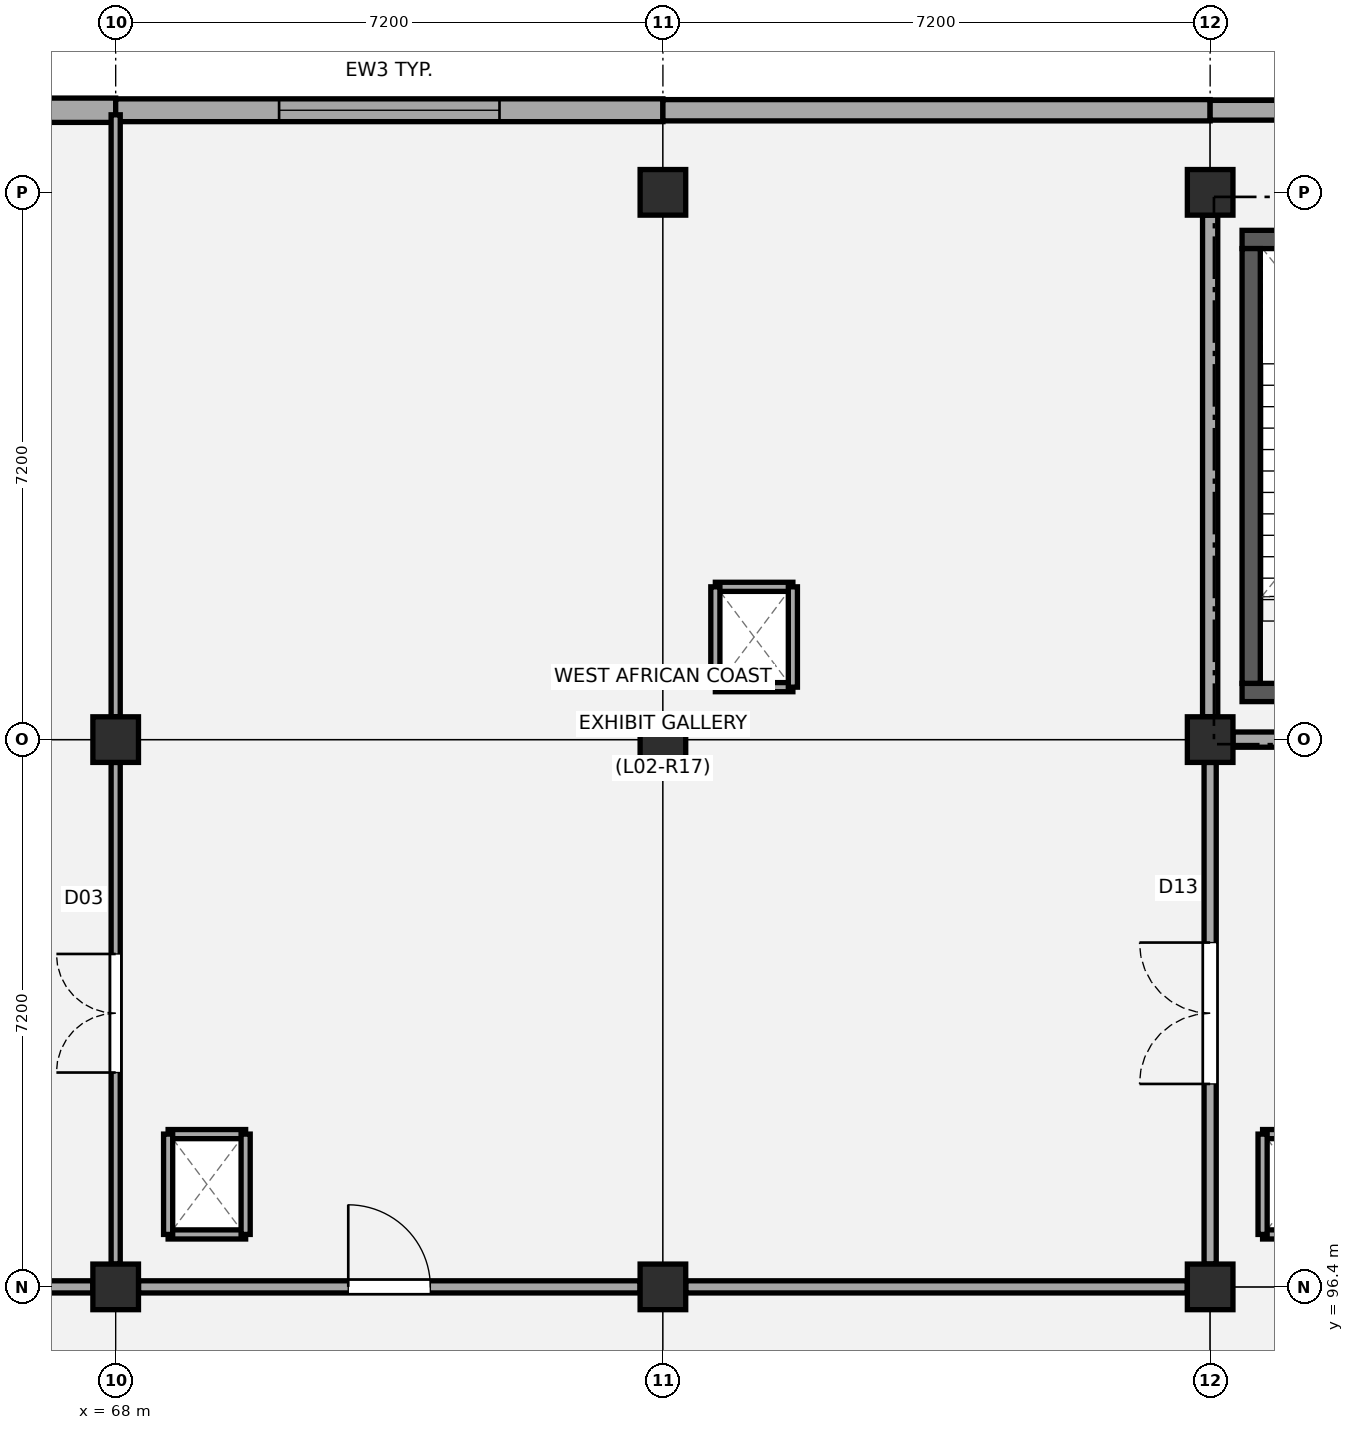
"""IFC4 building model, lengths in metres.
Left out: names, types, materials, properties, quantities, classifications, styles, units other than length and angle.
Written with IfcOpenShell. Run it as: python <this file> out.ifc"""

import sys

from ifc_helpers import new_model, si_unit, direction, frame, frame_2d, origin, origin_2d, place, context, subcontext, project, spatial, rectangle, extrude, element, fill, save


model = new_model("IFC4")
c1 = context("Model", 3, precision=1e-05, world=origin(), true_north=direction((0.0, 1.0)))
c2 = subcontext(c1, "Body", "Model", "MODEL_VIEW")
j1 = project(units=[si_unit("LENGTHUNIT", "METRE"), si_unit("PLANEANGLEUNIT", "RADIAN")], contexts=[c1])
p1 = place(None, origin())
s1 = spatial("IfcSite", under=j1, at=p1, CompositionType="ELEMENT")
p2 = place(p1, origin())
s2 = spatial("IfcBuilding", under=s1, at=p2, CompositionType="ELEMENT")
p3 = place(p2, frame((0.0, 0.0, 9.18)))
s3 = spatial("IfcBuildingStorey", under=s2, at=p3, CompositionType="ELEMENT", Elevation=9.18)
for number, where, z_axis, x_axis in (
    (1, (68.0, 96.4, 0.0), (0.0, 0.0, 1.0), (1.0, 0.0, 0.0)),
    (2, (68.0, 103.6, 0.0), (0.0, 0.0, 1.0), (1.0, 0.0, 0.0)),
    (3, (75.2, 96.4, 0.0), (0.0, 0.0, 1.0), (1.0, 0.0, 0.0)),
    (4, (75.2, 103.6, 0.0), (0.0, 0.0, 1.0), (1.0, 0.0, 0.0)),
    (5, (75.2, 110.8, 0.0), (0.0, 0.0, 1.0), (1.0, 0.0, 0.0)),
    (6, (82.4, 96.4, 0.0), (0.0, 0.0, 1.0), (1.0, 0.0, 0.0)),
    (7, (82.4, 103.6, 0.0), (0.0, 0.0, 1.0), (1.0, 0.0, 0.0)),
    (8, (82.4, 110.8, 0.0), (0.0, 0.0, 1.0), (1.0, 0.0, 0.0)),
):
    element("IfcColumn", number, at=place(p3, frame(where, z_axis=z_axis, x_axis=x_axis)), inside=s3, PredefinedType="COLUMN", context=c2, shape_type="SweptSolid", body=[
        extrude(rectangle(XDim=0.6, YDim=0.6, at=origin_2d()), origin(), (0.0, 0.0, 1.0), 4.32),
    ])
p4 = place(p3, frame((60.8, 111.88, 0.0), z_axis=(0.0, 0.0, 1.0), x_axis=(1.0, 0.0, 0.0)))
e9 = element("IfcWall", 9, at=p4, inside=s3, PredefinedType="STANDARD", context=c2, shape_type="SweptSolid", body=[
    extrude(rectangle(XDim=7.2, YDim=0.32, at=frame_2d((3.6, 0.0))), origin(), (0.0, 0.0, 1.0), 4.01),
])
p5 = place(p3, frame((68.0, 111.88, 0.0), z_axis=(0.0, 0.0, 1.0), x_axis=(1.0, 0.0, 0.0)))
e10 = element("IfcWall", 10, at=p5, inside=s3, PredefinedType="STANDARD", context=c2, shape_type="SweptSolid", body=[
    extrude(rectangle(XDim=7.2, YDim=0.3, at=frame_2d((3.6, 0.0))), origin(), (0.0, 0.0, 1.0), 4.03),
])
p6 = place(p5, frame((2.15, 0.0, 0.95)))
e11 = element("IfcOpeningElement", 11, at=p6, cuts=e10, PredefinedType="OPENING", context=c2, shape_type="SweptSolid", body=[
    extrude(rectangle(XDim=2.9, YDim=1.8, at=frame_2d((1.45, 0.9))), frame((0.0, 0.16, 0.0), z_axis=(0.0, -1.0, 0.0), x_axis=(1.0, 0.0, 0.0)), (0.0, 0.0, 1.0), 0.32),
])
p7 = place(p3, frame((75.2, 111.88, 0.0), z_axis=(0.0, 0.0, 1.0), x_axis=(1.0, 0.0, 0.0)))
e12 = element("IfcWall", 12, at=p7, inside=s3, PredefinedType="STANDARD", context=c2, shape_type="SweptSolid", body=[
    extrude(rectangle(XDim=7.2, YDim=0.28, at=frame_2d((3.6, 0.0))), origin(), (0.0, 0.0, 1.0), 4.01),
])
p8 = place(p3, frame((82.4, 111.88, 0.0), z_axis=(0.0, 0.0, 1.0), x_axis=(1.0, 0.0, 0.0)))
e13 = element("IfcWall", 13, at=p8, inside=s3, PredefinedType="STANDARD", context=c2, shape_type="SweptSolid", body=[
    extrude(rectangle(XDim=7.2, YDim=0.26, at=frame_2d((3.6, 0.0))), origin(), (0.0, 0.0, 1.0), 4.03),
])
for number, where, z_axis, x_axis in (
    (14, (82.82, 104.22, 0.0), (0.0, 0.0, 1.0), (1.0, 0.0, 0.0)),
    (15, (82.82, 110.18, 0.0), (0.0, 0.0, 1.0), (1.0, 0.0, 0.0)),
):
    element("IfcWall", number, at=place(p3, frame(where, z_axis=z_axis, x_axis=x_axis)), inside=s3, PredefinedType="SHEAR", context=c2, shape_type="SweptSolid", body=[
        extrude(rectangle(XDim=4.24, YDim=0.24, at=frame_2d((2.12, 0.0))), origin(), (0.0, 0.0, 1.0), 4.04),
    ])
p9 = place(p3, frame((82.94, 104.34, 0.0), z_axis=(0.0, 0.0, 1.0), x_axis=(0.0, 1.0, 0.0)))
e16 = element("IfcWall", 16, at=p9, inside=s3, PredefinedType="SHEAR", context=c2, shape_type="SweptSolid", body=[
    extrude(rectangle(XDim=5.72, YDim=0.24, at=frame_2d((2.86, 0.0))), origin(), (0.0, 0.0, 1.0), 4.04),
])
p10 = place(p3, frame((82.4, 103.9, 0.0), z_axis=(0.0, 0.0, 1.0), x_axis=(0.0, 1.0, 0.0)))
e17 = element("IfcWall", 17, at=p10, inside=s3, PredefinedType="PARTITIONING", context=c2, shape_type="SweptSolid", body=[
    extrude(rectangle(XDim=6.6, YDim=0.2, at=frame_2d((3.3, 0.0))), origin(), (0.0, 0.0, 1.0), 3.36),
])
p11 = place(p3, frame((82.7, 103.6, 0.0), z_axis=(0.0, 0.0, 1.0), x_axis=(1.0, 0.0, 0.0)))
e18 = element("IfcWall", 18, at=p11, inside=s3, PredefinedType="PARTITIONING", context=c2, shape_type="SweptSolid", body=[
    extrude(rectangle(XDim=4.24, YDim=0.2, at=frame_2d((2.12, 0.0))), origin(), (0.0, 0.0, 1.0), 3.41),
])
for number, where, z_axis, x_axis in (
    (19, (68.69, 97.09, 0.0), (0.0, 0.0, 1.0), (1.0, 0.0, 0.0)),
    (20, (68.69, 98.41, 0.0), (0.0, 0.0, 1.0), (1.0, 0.0, 0.0)),
):
    element("IfcWall", number, at=place(p3, frame(where, z_axis=z_axis, x_axis=x_axis)), inside=s3, PredefinedType="PARTITIONING", context=c2, shape_type="SweptSolid", body=[
        extrude(rectangle(XDim=1.02, YDim=0.12, at=frame_2d((0.51, 0.0))), origin(), (0.0, 0.0, 1.0), 4.0),
    ])
for number, where, z_axis, x_axis in (
    (21, (68.69, 97.09, 0.0), (0.0, 0.0, 1.0), (0.0, 1.0, 0.0)),
    (22, (69.71, 97.09, 0.0), (0.0, 0.0, 1.0), (0.0, 1.0, 0.0)),
):
    element("IfcWall", number, at=place(p3, frame(where, z_axis=z_axis, x_axis=x_axis)), inside=s3, PredefinedType="PARTITIONING", context=c2, shape_type="SweptSolid", body=[
        extrude(rectangle(XDim=1.32, YDim=0.12, at=frame_2d((0.66, 0.0))), origin(), (0.0, 0.0, 1.0), 4.0),
    ])
for number, where, z_axis, x_axis in (
    (23, (75.89, 104.29, 0.0), (0.0, 0.0, 1.0), (1.0, 0.0, 0.0)),
    (24, (75.89, 105.61, 0.0), (0.0, 0.0, 1.0), (1.0, 0.0, 0.0)),
):
    element("IfcWall", number, at=place(p3, frame(where, z_axis=z_axis, x_axis=x_axis)), inside=s3, PredefinedType="PARTITIONING", context=c2, shape_type="SweptSolid", body=[
        extrude(rectangle(XDim=1.02, YDim=0.12, at=frame_2d((0.51, 0.0))), origin(), (0.0, 0.0, 1.0), 4.0),
    ])
for number, where, z_axis, x_axis in (
    (25, (75.89, 104.29, 0.0), (0.0, 0.0, 1.0), (0.0, 1.0, 0.0)),
    (26, (76.91, 104.29, 0.0), (0.0, 0.0, 1.0), (0.0, 1.0, 0.0)),
):
    element("IfcWall", number, at=place(p3, frame(where, z_axis=z_axis, x_axis=x_axis)), inside=s3, PredefinedType="PARTITIONING", context=c2, shape_type="SweptSolid", body=[
        extrude(rectangle(XDim=1.32, YDim=0.12, at=frame_2d((0.66, 0.0))), origin(), (0.0, 0.0, 1.0), 4.0),
    ])
for number, where, z_axis, x_axis in (
    (27, (83.09, 97.09, 0.0), (0.0, 0.0, 1.0), (1.0, 0.0, 0.0)),
    (28, (83.09, 98.41, 0.0), (0.0, 0.0, 1.0), (1.0, 0.0, 0.0)),
):
    element("IfcWall", number, at=place(p3, frame(where, z_axis=z_axis, x_axis=x_axis)), inside=s3, PredefinedType="PARTITIONING", context=c2, shape_type="SweptSolid", body=[
        extrude(rectangle(XDim=1.02, YDim=0.12, at=frame_2d((0.51, 0.0))), origin(), (0.0, 0.0, 1.0), 4.0),
    ])
p12 = place(p3, frame((83.09, 97.09, 0.0), z_axis=(0.0, 0.0, 1.0), x_axis=(0.0, 1.0, 0.0)))
e29 = element("IfcWall", 29, at=p12, inside=s3, PredefinedType="PARTITIONING", context=c2, shape_type="SweptSolid", body=[
    extrude(rectangle(XDim=1.32, YDim=0.12, at=frame_2d((0.66, 0.0))), origin(), (0.0, 0.0, 1.0), 4.0),
])
p13 = place(p3, frame((61.1, 96.4, 0.0), z_axis=(0.0, 0.0, 1.0), x_axis=(1.0, 0.0, 0.0)))
e30 = element("IfcWall", 30, at=p13, inside=s3, PredefinedType="PARTITIONING", context=c2, shape_type="SweptSolid", body=[
    extrude(rectangle(XDim=6.6, YDim=0.16, at=frame_2d((3.3, 0.0))), origin(), (0.0, 0.0, 1.0), 3.41),
])
p14 = place(p13, frame((2.76, 0.0, 0.0)))
e31 = element("IfcOpeningElement", 31, at=p14, cuts=e30, PredefinedType="OPENING", context=c2, shape_type="SweptSolid", body=[
    extrude(rectangle(XDim=1.08, YDim=2.16, at=frame_2d((0.54, 1.08))), frame((0.0, 0.09, 0.0), z_axis=(0.0, -1.0, 0.0), x_axis=(1.0, 0.0, 0.0)), (0.0, 0.0, 1.0), 0.18),
])
p15 = place(p3, frame((68.0, 96.7, 0.0), z_axis=(0.0, 0.0, 1.0), x_axis=(0.0, 1.0, 0.0)))
e32 = element("IfcWall", 32, at=p15, inside=s3, PredefinedType="PARTITIONING", context=c2, shape_type="SweptSolid", body=[
    extrude(rectangle(XDim=6.6, YDim=0.12, at=frame_2d((3.3, 0.0))), origin(), (0.0, 0.0, 1.0), 3.41),
])
p16 = place(p15, frame((2.52, 0.0, 0.0)))
e33 = element("IfcOpeningElement", 33, at=p16, cuts=e32, PredefinedType="OPENING", context=c2, shape_type="SweptSolid", body=[
    extrude(rectangle(XDim=1.56, YDim=2.2, at=frame_2d((0.78, 1.1))), frame((0.0, 0.07, 0.0), z_axis=(0.0, -1.0, 0.0), x_axis=(1.0, 0.0, 0.0)), (0.0, 0.0, 1.0), 0.14),
])
p17 = place(p3, frame((68.0, 103.9, 0.0), z_axis=(0.0, 0.0, 1.0), x_axis=(0.0, 1.0, 0.0)))
e34 = element("IfcWall", 34, at=p17, inside=s3, PredefinedType="PARTITIONING", context=c2, shape_type="SweptSolid", body=[
    extrude(rectangle(XDim=7.92, YDim=0.12, at=frame_2d((3.96, 0.0))), origin(), (0.0, 0.0, 1.0), 3.36),
])
p18 = place(p3, frame((68.3, 96.4, 0.0), z_axis=(0.0, 0.0, 1.0), x_axis=(1.0, 0.0, 0.0)))
e35 = element("IfcWall", 35, at=p18, inside=s3, PredefinedType="PARTITIONING", context=c2, shape_type="SweptSolid", body=[
    extrude(rectangle(XDim=6.6, YDim=0.16, at=frame_2d((3.3, 0.0))), origin(), (0.0, 0.0, 1.0), 3.36),
])
p19 = place(p18, frame((2.76, 0.0, 0.0)))
e36 = element("IfcOpeningElement", 36, at=p19, cuts=e35, PredefinedType="OPENING", context=c2, shape_type="SweptSolid", body=[
    extrude(rectangle(XDim=1.08, YDim=2.16, at=frame_2d((0.54, 1.08))), frame((0.0, 0.09, 0.0), z_axis=(0.0, -1.0, 0.0), x_axis=(1.0, 0.0, 0.0)), (0.0, 0.0, 1.0), 0.18),
])
p20 = place(p3, frame((75.5, 96.4, 0.0), z_axis=(0.0, 0.0, 1.0), x_axis=(1.0, 0.0, 0.0)))
e37 = element("IfcWall", 37, at=p20, inside=s3, PredefinedType="PARTITIONING", context=c2, shape_type="SweptSolid", body=[
    extrude(rectangle(XDim=6.6, YDim=0.16, at=frame_2d((3.3, 0.0))), origin(), (0.0, 0.0, 1.0), 3.41),
])
p21 = place(p3, frame((82.4, 96.7, 0.0), z_axis=(0.0, 0.0, 1.0), x_axis=(0.0, 1.0, 0.0)))
e38 = element("IfcWall", 38, at=p21, inside=s3, PredefinedType="PARTITIONING", context=c2, shape_type="SweptSolid", body=[
    extrude(rectangle(XDim=6.6, YDim=0.16, at=frame_2d((3.3, 0.0))), origin(), (0.0, 0.0, 1.0), 3.41),
])
p22 = place(p21, frame((2.37, 0.0, 0.0)))
e39 = element("IfcOpeningElement", 39, at=p22, cuts=e38, PredefinedType="OPENING", context=c2, shape_type="SweptSolid", body=[
    extrude(rectangle(XDim=1.86, YDim=2.26, at=frame_2d((0.93, 1.13))), frame((0.0, 0.09, 0.0), z_axis=(0.0, -1.0, 0.0), x_axis=(1.0, 0.0, 0.0)), (0.0, 0.0, 1.0), 0.18),
])
p23 = place(p6, origin())
e40 = element("IfcWindow", 40, at=p23, inside=s3, PartitioningType="SINGLE_PANEL", PredefinedType="WINDOW", context=c2, shape_type="SweptSolid", body=[
    extrude(rectangle(XDim=2.9, YDim=1.8, at=frame_2d((1.45, 0.9))), frame((0.0, 0.03, 0.0), z_axis=(0.0, -1.0, 0.0), x_axis=(1.0, 0.0, 0.0)), (0.0, 0.0, 1.0), 0.06),
])
fill(e11, e40)
p24 = place(p19, origin())
e41 = element("IfcDoor", 41, at=p24, inside=s3, OperationType="SINGLE_SWING_LEFT", PredefinedType="DOOR", context=c2, shape_type="SweptSolid", body=[
    extrude(rectangle(XDim=1.08, YDim=2.16, at=frame_2d((0.54, 1.08))), frame((0.0, 0.025, 0.0), z_axis=(0.0, -1.0, 0.0), x_axis=(1.0, 0.0, 0.0)), (0.0, 0.0, 1.0), 0.05),
])
fill(e36, e41)
p25 = place(p22, origin())
e42 = element("IfcDoor", 42, at=p25, inside=s3, OperationType="DOUBLE_DOOR_SINGLE_SWING", PredefinedType="DOOR", context=c2, shape_type="SweptSolid", body=[
    extrude(rectangle(XDim=1.86, YDim=2.26, at=frame_2d((0.93, 1.13))), frame((0.0, 0.025, 0.0), z_axis=(0.0, -1.0, 0.0), x_axis=(1.0, 0.0, 0.0)), (0.0, 0.0, 1.0), 0.05),
])
fill(e39, e42)
p26 = place(p16, origin())
e43 = element("IfcDoor", 43, at=p26, inside=s3, OperationType="DOUBLE_DOOR_SINGLE_SWING", PredefinedType="DOOR", context=c2, shape_type="SweptSolid", body=[
    extrude(rectangle(XDim=1.56, YDim=2.2, at=frame_2d((0.78, 1.1))), frame((0.0, 0.025, 0.0), z_axis=(0.0, -1.0, 0.0), x_axis=(1.0, 0.0, 0.0)), (0.0, 0.0, 1.0), 0.05),
])
fill(e33, e43)
save(model, sys.argv[1])
